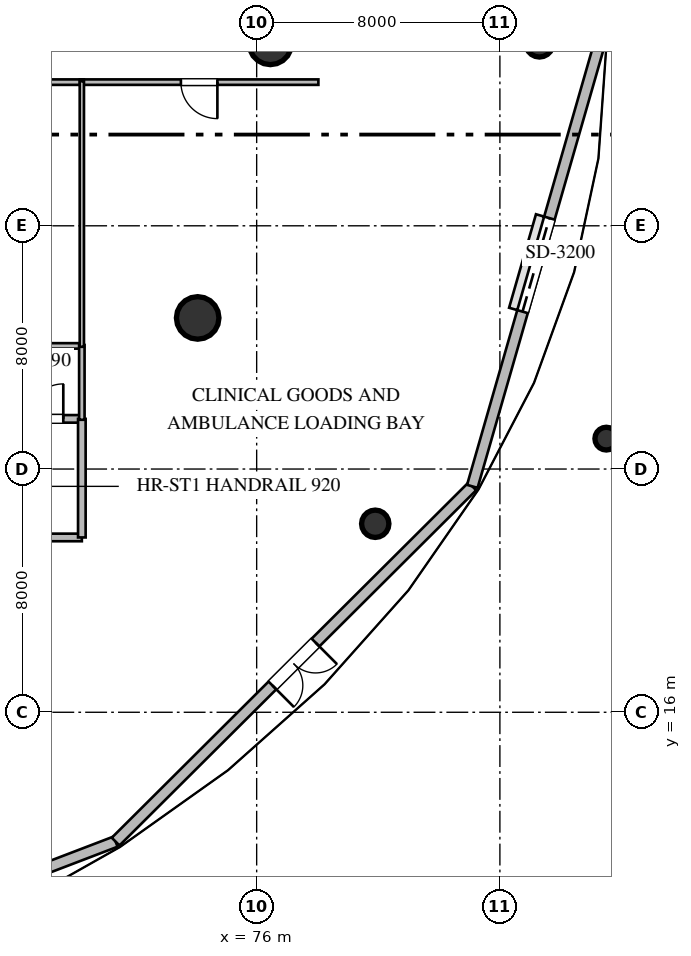
"""IFC4 building model, lengths in metres.
Left out: names, types, materials, properties, quantities, classifications, styles, units other than length and angle.
Written with IfcOpenShell. Run it as: python <this file> out.ifc"""

import sys

from ifc_helpers import new_model, si_unit, direction, frame, frame_2d, origin, origin_2d, place, context, subcontext, project, spatial, rectangle, circle, extrude, element, fill, save


model = new_model("IFC4")
c1 = context("Model", 3, precision=1e-05, world=origin(), true_north=direction((0.0, 1.0)))
c2 = subcontext(c1, "Body", "Model", "MODEL_VIEW")
j1 = project(units=[si_unit("LENGTHUNIT", "METRE"), si_unit("PLANEANGLEUNIT", "RADIAN")], contexts=[c1])
p1 = place(None, origin())
s1 = spatial("IfcSite", under=j1, at=p1, CompositionType="ELEMENT")
p2 = place(p1, origin())
s2 = spatial("IfcBuilding", under=s1, at=p2, CompositionType="ELEMENT")
p3 = place(p2, origin())
s3 = spatial("IfcBuildingStorey", under=s2, at=p3, CompositionType="ELEMENT", Elevation=0.0)
for number, where, z_axis, x_axis in (
    (1, (76.45, 38.0, 0.0), (0.0, 0.0, 1.0), (1.0, 0.0, 0.0)),
    (2, (74.06, 28.97, 0.0), (0.0, 0.0, 1.0), (1.0, 0.0, 0.0)),
):
    element("IfcColumn", number, at=place(p3, frame(where, z_axis=z_axis, x_axis=x_axis)), inside=s3, PredefinedType="COLUMN", context=c2, shape_type="SweptSolid", body=[
        extrude(circle(Radius=0.7, at=origin_2d()), origin(), (0.0, 0.0, 1.0), 4.8),
    ])
for number, where, z_axis, x_axis in (
    (3, (85.3, 38.0, 0.0), (0.0, 0.0, 1.0), (1.0, 0.0, 0.0)),
    (4, (79.9, 22.2, 0.0), (0.0, 0.0, 1.0), (1.0, 0.0, 0.0)),
):
    element("IfcColumn", number, at=place(p3, frame(where, z_axis=z_axis, x_axis=x_axis)), inside=s3, PredefinedType="COLUMN", context=c2, shape_type="SweptSolid", body=[
        extrude(circle(Radius=0.45, at=origin_2d()), origin(), (0.0, 0.0, 1.0), 4.8),
    ])
p4 = place(p3, frame((87.5, 25.0, 0.0), z_axis=(0.0, 0.0, 1.0), x_axis=(1.0, 0.0, 0.0)))
e5 = element("IfcColumn", 5, at=p4, inside=s3, PredefinedType="COLUMN", context=c2, shape_type="SweptSolid", body=[
    extrude(circle(Radius=0.375, at=origin_2d()), origin(), (0.0, 0.0, 1.0), 4.8),
])
p5 = place(p3, frame((71.361, 11.746, 0.0), z_axis=(0.0, 0.0, 1.0), x_axis=(-0.934014086565, -0.357236176917, 0.0)))
e6 = element("IfcWall", 6, at=p5, inside=s3, PredefinedType="STANDARD", context=c2, shape_type="SweptSolid", body=[
    extrude(rectangle(XDim=18.151, YDim=0.36, at=frame_2d((9.075, 0.0))), origin(), (0.0, 0.0, 1.0), 4.52),
])
p6 = place(p5, frame((8.075, 0.0, 0.0)))
e7 = element("IfcOpeningElement", 7, at=p6, cuts=e6, PredefinedType="OPENING", context=c2, shape_type="SweptSolid", body=[
    extrude(rectangle(XDim=2.0, YDim=2.2, at=frame_2d((1.0, 1.1))), frame((0.0, 0.19, 0.0), z_axis=(0.0, -1.0, 0.0), x_axis=(1.0, 0.0, 0.0)), (0.0, 0.0, 1.0), 0.38),
])
p7 = place(p3, frame((83.093, 23.43, 0.0), z_axis=(0.0, 0.0, 1.0), x_axis=(-0.708557675059, -0.705652904135, 0.0)))
e8 = element("IfcWall", 8, at=p7, inside=s3, PredefinedType="STANDARD", context=c2, shape_type="SweptSolid", body=[
    extrude(rectangle(XDim=16.557, YDim=0.36, at=frame_2d((8.279, 0.0))), origin(), (0.0, 0.0, 1.0), 4.52),
])
p8 = place(p7, frame((7.279, 0.0, 0.0)))
e9 = element("IfcOpeningElement", 9, at=p8, cuts=e8, PredefinedType="OPENING", context=c2, shape_type="SweptSolid", body=[
    extrude(rectangle(XDim=2.0, YDim=2.2, at=frame_2d((1.0, 1.1))), frame((0.0, 0.19, 0.0), z_axis=(0.0, -1.0, 0.0), x_axis=(1.0, 0.0, 0.0)), (0.0, 0.0, 1.0), 0.38),
])
p9 = place(p3, frame((83.093, 23.43, 0.0), z_axis=(0.0, 0.0, 1.0), x_axis=(0.276192699339, 0.961102280109, 0.0)))
e10 = element("IfcWall", 10, at=p9, inside=s3, PredefinedType="STANDARD", context=c2, shape_type="SweptSolid", body=[
    extrude(rectangle(XDim=15.16, YDim=0.36, at=frame_2d((7.58, 0.0))), origin(), (0.0, 0.0, 1.0), 4.52),
])
p10 = place(p9, frame((5.98, 0.0, 0.0)))
e11 = element("IfcOpeningElement", 11, at=p10, cuts=e10, PredefinedType="OPENING", context=c2, shape_type="SweptSolid", body=[
    extrude(rectangle(XDim=3.2, YDim=3.4, at=frame_2d((1.6, 1.7))), frame((0.0, 0.19, 0.0), z_axis=(0.0, -1.0, 0.0), x_axis=(1.0, 0.0, 0.0)), (0.0, 0.0, 1.0), 0.38),
])
p11 = place(p3, frame((62.35, 25.65, 0.0), z_axis=(0.0, 0.0, 1.0), x_axis=(1.0, 0.0, 0.0)))
e12 = element("IfcWall", 12, at=p11, inside=s3, PredefinedType="SOLIDWALL", context=c2, shape_type="SweptSolid", body=[
    extrude(rectangle(XDim=7.9, YDim=0.25, at=frame_2d((3.95, 0.0))), origin(), (0.0, 0.0, 1.0), 4.52),
])
p12 = place(p11, frame((6.14, 0.0, 0.0)))
e13 = element("IfcOpeningElement", 13, at=p12, cuts=e12, PredefinedType="OPENING", context=c2, shape_type="SweptSolid", body=[
    extrude(rectangle(XDim=1.15, YDim=2.1, at=frame_2d((0.575, 1.05))), frame((0.0, 0.135, 0.0), z_axis=(0.0, -1.0, 0.0), x_axis=(1.0, 0.0, 0.0)), (0.0, 0.0, 1.0), 0.27),
])
p13 = place(p3, frame((62.35, 21.75, 0.0), z_axis=(0.0, 0.0, 1.0), x_axis=(1.0, 0.0, 0.0)))
e14 = element("IfcWall", 14, at=p13, inside=s3, PredefinedType="SOLIDWALL", context=c2, shape_type="SweptSolid", body=[
    extrude(rectangle(XDim=7.9, YDim=0.25, at=frame_2d((3.95, 0.0))), origin(), (0.0, 0.0, 1.0), 4.52),
])
p14 = place(p3, frame((70.25, 21.75, 0.0), z_axis=(0.0, 0.0, 1.0), x_axis=(0.0, 1.0, 0.0)))
e15 = element("IfcWall", 15, at=p14, inside=s3, PredefinedType="SOLIDWALL", context=c2, shape_type="SweptSolid", body=[
    extrude(rectangle(XDim=3.9, YDim=0.25, at=frame_2d((1.95, 0.0))), origin(), (0.0, 0.0, 1.0), 4.52),
])
p15 = place(p3, frame((70.315, 36.725, 0.0), z_axis=(0.0, 0.0, 1.0), x_axis=(-1.0, 0.0, 0.0)))
e16 = element("IfcWall", 16, at=p15, inside=s3, PredefinedType="PARTITIONING", context=c2, shape_type="SweptSolid", body=[
    extrude(rectangle(XDim=23.62, YDim=0.18, at=frame_2d((11.81, 0.0))), origin(), (0.0, 0.0, 1.0), 3.966),
])
p16 = place(p15, frame((11.21, 0.0, 0.0)))
e17 = element("IfcOpeningElement", 17, at=p16, cuts=e16, PredefinedType="OPENING", context=c2, shape_type="SweptSolid", body=[
    extrude(rectangle(XDim=1.2, YDim=2.15, at=frame_2d((0.6, 1.075))), frame((0.0, 0.1, 0.0), z_axis=(0.0, -1.0, 0.0), x_axis=(1.0, 0.0, 0.0)), (0.0, 0.0, 1.0), 0.2),
])
p17 = place(p3, frame((46.695, 28.05, 0.0), z_axis=(0.0, 0.0, 1.0), x_axis=(1.0, 0.0, 0.0)))
e18 = element("IfcWall", 18, at=p17, inside=s3, PredefinedType="PARTITIONING", context=c2, shape_type="SweptSolid", body=[
    extrude(rectangle(XDim=23.585, YDim=0.18, at=frame_2d((11.792, 0.0))), origin(), (0.0, 0.0, 1.0), 3.966),
])
p18 = place(p3, frame((78.03, 36.725, 0.0), z_axis=(0.0, 0.0, 1.0), x_axis=(-1.0, 0.0, 0.0)))
e19 = element("IfcWall", 19, at=p18, inside=s3, PredefinedType="PARTITIONING", context=c2, shape_type="SweptSolid", body=[
    extrude(rectangle(XDim=7.845, YDim=0.18, at=frame_2d((3.922, 0.0))), origin(), (0.0, 0.0, 1.0), 4.52),
])
p19 = place(p18, frame((3.322, 0.0, 0.0)))
e20 = element("IfcOpeningElement", 20, at=p19, cuts=e19, PredefinedType="OPENING", context=c2, shape_type="SweptSolid", body=[
    extrude(rectangle(XDim=1.2, YDim=2.15, at=frame_2d((0.6, 1.075))), frame((0.0, 0.1, 0.0), z_axis=(0.0, -1.0, 0.0), x_axis=(1.0, 0.0, 0.0)), (0.0, 0.0, 1.0), 0.2),
])
p20 = place(p3, frame((70.25, 28.08, 0.0), z_axis=(0.0, 0.0, 1.0), x_axis=(0.0, -1.0, 0.0)))
e21 = element("IfcWall", 21, at=p20, inside=s3, PredefinedType="PARTITIONING", context=c2, shape_type="SweptSolid", body=[
    extrude(rectangle(XDim=2.46, YDim=0.18, at=frame_2d((1.23, 0.0))), origin(), (0.0, 0.0, 1.0), 4.52),
])
p21 = place(p3, frame((70.25, 36.755, 0.0), z_axis=(0.0, 0.0, 1.0), x_axis=(0.0, -1.0, 0.0)))
e22 = element("IfcWall", 22, at=p21, inside=s3, PredefinedType="PARTITIONING", context=c2, shape_type="SweptSolid", body=[
    extrude(rectangle(XDim=8.735, YDim=0.14, at=frame_2d((4.367, 0.0))), origin(), (0.0, 0.0, 1.0), 4.52),
])
p22 = place(p8, origin())
e23 = element("IfcDoor", 23, at=p22, inside=s3, OperationType="DOUBLE_DOOR_SINGLE_SWING", PredefinedType="DOOR", context=c2, shape_type="SweptSolid", body=[
    extrude(rectangle(XDim=2.0, YDim=2.2, at=frame_2d((1.0, 1.1))), frame((0.0, 0.025, 0.0), z_axis=(0.0, -1.0, 0.0), x_axis=(1.0, 0.0, 0.0)), (0.0, 0.0, 1.0), 0.05),
])
fill(e9, e23)
p23 = place(p10, origin())
e24 = element("IfcDoor", 24, at=p23, inside=s3, OperationType="ROLLINGUP", PredefinedType="GATE", context=c2, shape_type="SweptSolid", body=[
    extrude(rectangle(XDim=3.2, YDim=3.4, at=frame_2d((1.6, 1.7))), frame((0.0, 0.025, 0.0), z_axis=(0.0, -1.0, 0.0), x_axis=(1.0, 0.0, 0.0)), (0.0, 0.0, 1.0), 0.05),
])
fill(e11, e24)
p24 = place(p12, origin())
e25 = element("IfcDoor", 25, at=p24, inside=s3, OperationType="SINGLE_SWING_RIGHT", PredefinedType="DOOR", context=c2, shape_type="SweptSolid", body=[
    extrude(rectangle(XDim=1.15, YDim=2.1, at=frame_2d((0.575, 1.05))), frame((0.0, 0.025, 0.0), z_axis=(0.0, -1.0, 0.0), x_axis=(1.0, 0.0, 0.0)), (0.0, 0.0, 1.0), 0.05),
])
fill(e13, e25)
p25 = place(p19, origin())
e26 = element("IfcDoor", 26, at=p25, inside=s3, OperationType="SINGLE_SWING_LEFT", PredefinedType="DOOR", context=c2, shape_type="SweptSolid", body=[
    extrude(rectangle(XDim=1.2, YDim=2.15, at=frame_2d((0.6, 1.075))), frame((0.0, 0.025, 0.0), z_axis=(0.0, -1.0, 0.0), x_axis=(1.0, 0.0, 0.0)), (0.0, 0.0, 1.0), 0.05),
])
fill(e20, e26)
save(model, sys.argv[1])
